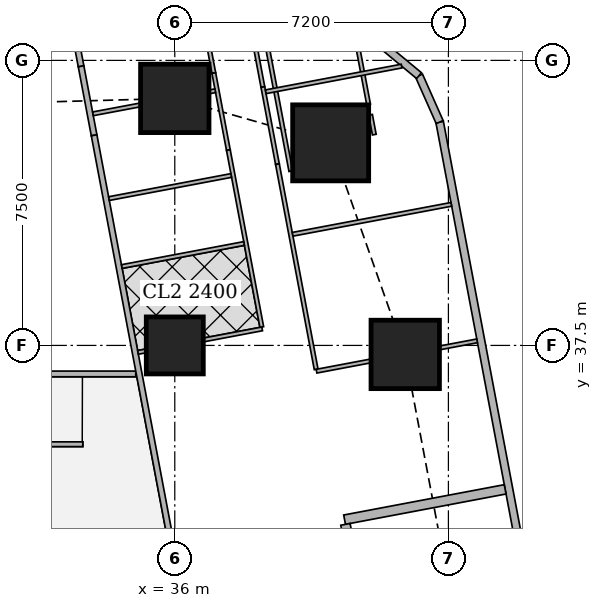
"""IFC4 building model, lengths in metres.
Left out: names, types, materials, properties, quantities, classifications, styles, units other than length and angle.
Written with IfcOpenShell. Run it as: python <this file> out.ifc"""

import sys

from ifc_helpers import new_model, si_unit, direction, frame, frame_2d, origin, origin_2d, place, context, subcontext, project, spatial, rectangle, extrude, element, fill, save


model = new_model("IFC4")
c1 = context("Model", 3, precision=1e-05, world=origin(), true_north=direction((0.0, 1.0)))
c2 = subcontext(c1, "Body", "Model", "MODEL_VIEW")
j1 = project(units=[si_unit("LENGTHUNIT", "METRE"), si_unit("PLANEANGLEUNIT", "RADIAN")], contexts=[c1])
p1 = place(None, origin())
s1 = spatial("IfcSite", under=j1, at=p1, CompositionType="ELEMENT")
p2 = place(p1, origin())
s2 = spatial("IfcBuilding", under=s1, at=p2, CompositionType="ELEMENT")
p3 = place(p2, frame((0.0, 0.0, 169.55)))
s3 = spatial("IfcBuildingStorey", under=s2, at=p3, CompositionType="ELEMENT", Elevation=169.55)
p4 = place(p3, frame((36.0, 37.5, 0.0), z_axis=(0.0, 0.0, 1.0), x_axis=(1.0, 0.0, 0.0)))
e1 = element("IfcColumn", 1, at=p4, inside=s3, PredefinedType="COLUMN", context=c2, shape_type="SweptSolid", body=[
    extrude(rectangle(XDim=1.5, YDim=1.5, at=origin_2d()), origin(), (0.0, 0.0, 1.0), 3.75),
])
p5 = place(p3, frame((42.064, 37.263, 0.0), z_axis=(0.0, 0.0, 1.0), x_axis=(1.0, 0.0, 0.0)))
e2 = element("IfcColumn", 2, at=p5, inside=s3, PredefinedType="COLUMN", context=c2, shape_type="SweptSolid", body=[
    extrude(rectangle(XDim=1.8, YDim=1.8, at=origin_2d()), origin(), (0.0, 0.0, 1.0), 3.75),
])
p6 = place(p3, frame((40.102, 42.83, 0.0), z_axis=(0.0, 0.0, 1.0), x_axis=(1.0, 0.0, 0.0)))
e3 = element("IfcColumn", 3, at=p6, inside=s3, PredefinedType="COLUMN", context=c2, shape_type="SweptSolid", body=[
    extrude(rectangle(XDim=2.0, YDim=2.0, at=origin_2d()), origin(), (0.0, 0.0, 1.0), 3.75),
])
p7 = place(p3, frame((36.0, 44.0, 0.0), z_axis=(0.0, 0.0, 1.0), x_axis=(1.0, 0.0, 0.0)))
e4 = element("IfcColumn", 4, at=p7, inside=s3, PredefinedType="COLUMN", context=c2, shape_type="SweptSolid", body=[
    extrude(rectangle(XDim=1.8, YDim=1.8, at=origin_2d()), origin(), (0.0, 0.0, 1.0), 3.75),
])
p8 = place(p3, frame((50.653, 2.703, 0.0), z_axis=(0.0, 0.0, 1.0), x_axis=(-0.185612026696, 0.982623109613, 0.0)))
e5 = element("IfcWall", 5, at=p8, inside=s3, PredefinedType="SOLIDWALL", context=c2, shape_type="SweptSolid", body=[
    extrude(rectangle(XDim=41.393, YDim=0.2, at=frame_2d((20.697, 0.0))), origin(), (0.0, 0.0, 1.0), 3.5),
])
p9 = place(p8, frame((1.633, 0.0, 0.9)))
e6 = element("IfcOpeningElement", 6, at=p9, cuts=e5, PredefinedType="OPENING", context=c2, shape_type="SweptSolid", body=[
    extrude(rectangle(XDim=1.8, YDim=1.5, at=frame_2d((0.9, 0.75))), frame((0.0, 0.11, 0.0), z_axis=(0.0, -1.0, 0.0), x_axis=(1.0, 0.0, 0.0)), (0.0, 0.0, 1.0), 0.22),
])
p10 = place(p8, frame((6.032, 0.0, 0.9)))
e7 = element("IfcOpeningElement", 7, at=p10, cuts=e5, PredefinedType="OPENING", context=c2, shape_type="SweptSolid", body=[
    extrude(rectangle(XDim=1.8, YDim=1.5, at=frame_2d((0.9, 0.75))), frame((0.0, 0.11, 0.0), z_axis=(0.0, -1.0, 0.0), x_axis=(1.0, 0.0, 0.0)), (0.0, 0.0, 1.0), 0.22),
])
p11 = place(p8, frame((9.848, 0.0, 0.9)))
e8 = element("IfcOpeningElement", 8, at=p11, cuts=e5, PredefinedType="OPENING", context=c2, shape_type="SweptSolid", body=[
    extrude(rectangle(XDim=1.8, YDim=1.5, at=frame_2d((0.9, 0.75))), frame((0.0, 0.11, 0.0), z_axis=(0.0, -1.0, 0.0), x_axis=(1.0, 0.0, 0.0)), (0.0, 0.0, 1.0), 0.22),
])
p12 = place(p8, frame((13.664, 0.0, 0.9)))
e9 = element("IfcOpeningElement", 9, at=p12, cuts=e5, PredefinedType="OPENING", context=c2, shape_type="SweptSolid", body=[
    extrude(rectangle(XDim=1.8, YDim=1.5, at=frame_2d((0.9, 0.75))), frame((0.0, 0.11, 0.0), z_axis=(0.0, -1.0, 0.0), x_axis=(1.0, 0.0, 0.0)), (0.0, 0.0, 1.0), 0.22),
])
p13 = place(p8, frame((17.481, 0.0, 0.9)))
e10 = element("IfcOpeningElement", 10, at=p13, cuts=e5, PredefinedType="OPENING", context=c2, shape_type="SweptSolid", body=[
    extrude(rectangle(XDim=1.8, YDim=1.5, at=frame_2d((0.9, 0.75))), frame((0.0, 0.11, 0.0), z_axis=(0.0, -1.0, 0.0), x_axis=(1.0, 0.0, 0.0)), (0.0, 0.0, 1.0), 0.22),
])
p14 = place(p8, frame((21.297, 0.0, 0.9)))
e11 = element("IfcOpeningElement", 11, at=p14, cuts=e5, PredefinedType="OPENING", context=c2, shape_type="SweptSolid", body=[
    extrude(rectangle(XDim=1.8, YDim=1.5, at=frame_2d((0.9, 0.75))), frame((0.0, 0.11, 0.0), z_axis=(0.0, -1.0, 0.0), x_axis=(1.0, 0.0, 0.0)), (0.0, 0.0, 1.0), 0.22),
])
p15 = place(p8, frame((25.113, 0.0, 0.9)))
e12 = element("IfcOpeningElement", 12, at=p15, cuts=e5, PredefinedType="OPENING", context=c2, shape_type="SweptSolid", body=[
    extrude(rectangle(XDim=1.8, YDim=1.5, at=frame_2d((0.9, 0.75))), frame((0.0, 0.11, 0.0), z_axis=(0.0, -1.0, 0.0), x_axis=(1.0, 0.0, 0.0)), (0.0, 0.0, 1.0), 0.22),
])
p16 = place(p8, frame((28.93, 0.0, 0.9)))
e13 = element("IfcOpeningElement", 13, at=p16, cuts=e5, PredefinedType="OPENING", context=c2, shape_type="SweptSolid", body=[
    extrude(rectangle(XDim=1.8, YDim=1.5, at=frame_2d((0.9, 0.75))), frame((0.0, 0.11, 0.0), z_axis=(0.0, -1.0, 0.0), x_axis=(1.0, 0.0, 0.0)), (0.0, 0.0, 1.0), 0.22),
])
p17 = place(p8, frame((32.746, 0.0, 0.9)))
e14 = element("IfcOpeningElement", 14, at=p17, cuts=e5, PredefinedType="OPENING", context=c2, shape_type="SweptSolid", body=[
    extrude(rectangle(XDim=1.8, YDim=1.5, at=frame_2d((0.9, 0.75))), frame((0.0, 0.11, 0.0), z_axis=(0.0, -1.0, 0.0), x_axis=(1.0, 0.0, 0.0)), (0.0, 0.0, 1.0), 0.22),
])
p18 = place(p8, frame((36.481, 0.0, 0.9)))
e15 = element("IfcOpeningElement", 15, at=p18, cuts=e5, PredefinedType="OPENING", context=c2, shape_type="SweptSolid", body=[
    extrude(rectangle(XDim=1.8, YDim=1.5, at=frame_2d((0.9, 0.75))), frame((0.0, 0.11, 0.0), z_axis=(0.0, -1.0, 0.0), x_axis=(1.0, 0.0, 0.0)), (0.0, 0.0, 1.0), 0.22),
])
p19 = place(p3, frame((42.97, 43.377, 0.0), z_axis=(0.0, 0.0, 1.0), x_axis=(-0.406002956633, 0.913871762998, 0.0)))
e16 = element("IfcWall", 16, at=p19, inside=s3, PredefinedType="SOLIDWALL", context=c2, shape_type="SweptSolid", body=[
    extrude(rectangle(XDim=1.337, YDim=0.2, at=frame_2d((0.669, 0.0))), origin(), (0.0, 0.0, 1.0), 3.5),
])
p20 = place(p3, frame((42.427, 44.599, 0.0), z_axis=(0.0, 0.0, 1.0), x_axis=(-0.770091412544, 0.637933551655, 0.0)))
e17 = element("IfcWall", 17, at=p20, inside=s3, PredefinedType="SOLIDWALL", context=c2, shape_type="SweptSolid", body=[
    extrude(rectangle(XDim=1.324, YDim=0.2, at=frame_2d((0.662, 0.0))), origin(), (0.0, 0.0, 1.0), 3.5),
])
p21 = place(p3, frame((29.551, 36.75, 0.0), z_axis=(0.0, 0.0, 1.0), x_axis=(1.0, 0.0, 0.0)))
e18 = element("IfcWall", 18, at=p21, inside=s3, PredefinedType="SOLIDWALL", context=c2, shape_type="SweptSolid", body=[
    extrude(rectangle(XDim=5.422, YDim=0.15, at=frame_2d((2.711, 0.0))), origin(), (0.0, 0.0, 1.0), 3.5),
])
p22 = place(p21, frame((2.895, 0.0, 0.0)))
e19 = element("IfcOpeningElement", 19, at=p22, cuts=e18, PredefinedType="OPENING", context=c2, shape_type="SweptSolid", body=[
    extrude(rectangle(XDim=1.0, YDim=2.1, at=frame_2d((0.5, 1.05))), frame((0.0, 0.085, 0.0), z_axis=(0.0, -1.0, 0.0), x_axis=(1.0, 0.0, 0.0)), (0.0, 0.0, 1.0), 0.17),
])
p23 = place(p3, frame((33.382, 45.65, 0.0), z_axis=(0.0, 0.0, 1.0), x_axis=(0.185169202764, -0.982706653253, 0.0)))
e20 = element("IfcWall", 20, at=p23, inside=s3, PredefinedType="SOLIDWALL", context=c2, shape_type="SweptSolid", body=[
    extrude(rectangle(XDim=0.82, YDim=0.15, at=frame_2d((0.41, 0.0))), origin(), (0.0, 0.0, 1.0), 3.5),
])
p24 = place(p3, frame((33.534, 44.844, 0.0), z_axis=(0.0, 0.0, 1.0), x_axis=(0.185708872674, -0.982604811005, 0.0)))
e21 = element("IfcWall", 21, at=p24, inside=s3, PredefinedType="SOLIDWALL", context=c2, shape_type="SweptSolid", body=[
    extrude(rectangle(XDim=1.847, YDim=0.15, at=frame_2d((0.924, 0.0))), origin(), (0.0, 0.0, 1.0), 2.1),
])
p25 = place(p3, frame((33.877, 43.029, 0.0), z_axis=(0.0, 0.0, 1.0), x_axis=(0.185596841028, -0.98262597798, 0.0)))
e22 = element("IfcWall", 22, at=p25, inside=s3, PredefinedType="SOLIDWALL", context=c2, shape_type="SweptSolid", body=[
    extrude(rectangle(XDim=41.66, YDim=0.15, at=frame_2d((20.83, 0.0))), origin(), (0.0, 0.0, 1.0), 2.5),
])
p26 = place(p25, frame((8.63, 0.0, 0.0)))
e23 = element("IfcOpeningElement", 23, at=p26, cuts=e22, PredefinedType="OPENING", context=c2, shape_type="SweptSolid", body=[
    extrude(rectangle(XDim=1.0, YDim=2.1, at=frame_2d((0.5, 1.05))), frame((0.0, 0.085, 0.0), z_axis=(0.0, -1.0, 0.0), x_axis=(1.0, 0.0, 0.0)), (0.0, 0.0, 1.0), 0.17),
])
p27 = place(p25, frame((13.841, 0.0, 0.0)))
e24 = element("IfcOpeningElement", 24, at=p27, cuts=e22, PredefinedType="OPENING", context=c2, shape_type="SweptSolid", body=[
    extrude(rectangle(XDim=1.0, YDim=2.1, at=frame_2d((0.5, 1.05))), frame((0.0, 0.085, 0.0), z_axis=(0.0, -1.0, 0.0), x_axis=(1.0, 0.0, 0.0)), (0.0, 0.0, 1.0), 0.17),
])
p28 = place(p25, frame((21.474, 0.0, 0.0)))
e25 = element("IfcOpeningElement", 25, at=p28, cuts=e22, PredefinedType="OPENING", context=c2, shape_type="SweptSolid", body=[
    extrude(rectangle(XDim=1.0, YDim=2.1, at=frame_2d((0.5, 1.05))), frame((0.0, 0.085, 0.0), z_axis=(0.0, -1.0, 0.0), x_axis=(1.0, 0.0, 0.0)), (0.0, 0.0, 1.0), 0.17),
])
p29 = place(p25, frame((30.4, 0.0, 0.0)))
e26 = element("IfcOpeningElement", 26, at=p29, cuts=e22, PredefinedType="OPENING", context=c2, shape_type="SweptSolid", body=[
    extrude(rectangle(XDim=1.0, YDim=2.1, at=frame_2d((0.5, 1.05))), frame((0.0, 0.085, 0.0), z_axis=(0.0, -1.0, 0.0), x_axis=(1.0, 0.0, 0.0)), (0.0, 0.0, 1.0), 0.17),
])
p30 = place(p25, frame((32.288, 0.0, 0.0)))
e27 = element("IfcOpeningElement", 27, at=p30, cuts=e22, PredefinedType="OPENING", context=c2, shape_type="SweptSolid", body=[
    extrude(rectangle(XDim=1.0, YDim=2.1, at=frame_2d((0.5, 1.05))), frame((0.0, 0.085, 0.0), z_axis=(0.0, -1.0, 0.0), x_axis=(1.0, 0.0, 0.0)), (0.0, 0.0, 1.0), 0.17),
])
p31 = place(p3, frame((39.054, 42.085, 0.0), z_axis=(0.0, 0.0, 1.0), x_axis=(-0.185791584218, 0.982589175207, 0.0)))
e28 = element("IfcWall", 28, at=p31, inside=s3, PredefinedType="PARTITIONING", context=c2, shape_type="SweptSolid", body=[
    extrude(rectangle(XDim=3.628, YDim=0.1, at=frame_2d((1.814, 0.0))), origin(), (0.0, 0.0, 1.0), 2.1),
])
p32 = place(p3, frame((40.789, 45.487, 0.0), z_axis=(0.0, 0.0, 1.0), x_axis=(0.185572395193, -0.982630594955, 0.0)))
e29 = element("IfcWall", 29, at=p32, inside=s3, PredefinedType="PARTITIONING", context=c2, shape_type="SweptSolid", body=[
    extrude(rectangle(XDim=1.676, YDim=0.1, at=frame_2d((0.838, 0.0))), origin(), (0.0, 0.0, 1.0), 3.5),
])
p33 = place(p3, frame((41.151, 43.569, 0.0), z_axis=(0.0, 0.0, 1.0), x_axis=(0.186563073924, -0.982442985342, 0.0)))
e30 = element("IfcWall", 30, at=p33, inside=s3, PredefinedType="PARTITIONING", context=c2, shape_type="SweptSolid", body=[
    extrude(rectangle(XDim=0.531, YDim=0.1, at=frame_2d((0.266, 0.0))), origin(), (0.0, 0.0, 1.0), 3.5),
])
p34 = place(p3, frame((38.063, 45.65, 0.0), z_axis=(0.0, 0.0, 1.0), x_axis=(0.185456359766, -0.982652501458, 0.0)))
e31 = element("IfcWall", 31, at=p34, inside=s3, PredefinedType="PARTITIONING", context=c2, shape_type="SweptSolid", body=[
    extrude(rectangle(XDim=1.376, YDim=0.1, at=frame_2d((0.688, 0.0))), origin(), (0.0, 0.0, 1.0), 3.5),
])
p35 = place(p3, frame((38.318, 44.298, 0.0), z_axis=(0.0, 0.0, 1.0), x_axis=(0.185481135188, -0.982647825261, 0.0)))
e32 = element("IfcWall", 32, at=p35, inside=s3, PredefinedType="PARTITIONING", context=c2, shape_type="SweptSolid", body=[
    extrude(rectangle(XDim=2.064, YDim=0.1, at=frame_2d((1.032, 0.0))), origin(), (0.0, 0.0, 1.0), 2.1),
])
p36 = place(p3, frame((38.701, 42.27, 0.0), z_axis=(0.0, 0.0, 1.0), x_axis=(0.185474244877, -0.982649125826, 0.0)))
e33 = element("IfcWall", 33, at=p36, inside=s3, PredefinedType="PARTITIONING", context=c2, shape_type="SweptSolid", body=[
    extrude(rectangle(XDim=5.494, YDim=0.1, at=frame_2d((2.747, 0.0))), origin(), (0.0, 0.0, 1.0), 3.5),
])
p37 = place(p36, frame((3.085, 0.0, 0.0)))
e34 = element("IfcOpeningElement", 34, at=p37, cuts=e33, PredefinedType="OPENING", context=c2, shape_type="SweptSolid", body=[
    extrude(rectangle(XDim=0.9, YDim=2.1, at=frame_2d((0.45, 1.05))), frame((0.0, 0.06, 0.0), z_axis=(0.0, -1.0, 0.0), x_axis=(1.0, 0.0, 0.0)), (0.0, 0.0, 1.0), 0.12),
])
p38 = place(p3, frame((36.841, 45.65, 0.0), z_axis=(0.0, 0.0, 1.0), x_axis=(0.185789875365, -0.982589498322, 0.0)))
e35 = element("IfcWall", 35, at=p38, inside=s3, PredefinedType="PARTITIONING", context=c2, shape_type="SweptSolid", body=[
    extrude(rectangle(XDim=1.001, YDim=0.1, at=frame_2d((0.5, 0.0))), origin(), (0.0, 0.0, 1.0), 3.5),
])
p39 = place(p3, frame((37.027, 44.666, 0.0), z_axis=(0.0, 0.0, 1.0), x_axis=(0.1855674151, -0.982631535446, 0.0)))
e36 = element("IfcWall", 36, at=p39, inside=s3, PredefinedType="PARTITIONING", context=c2, shape_type="SweptSolid", body=[
    extrude(rectangle(XDim=2.063, YDim=0.1, at=frame_2d((1.031, 0.0))), origin(), (0.0, 0.0, 1.0), 2.1),
])
p40 = place(p3, frame((37.41, 42.639, 0.0), z_axis=(0.0, 0.0, 1.0), x_axis=(0.185579683022, -0.982629218601, 0.0)))
e37 = element("IfcWall", 37, at=p40, inside=s3, PredefinedType="PARTITIONING", context=c2, shape_type="SweptSolid", body=[
    extrude(rectangle(XDim=4.737, YDim=0.1, at=frame_2d((2.369, 0.0))), origin(), (0.0, 0.0, 1.0), 3.5),
])
p41 = place(p40, frame((3.189, 0.0, 0.0)))
e38 = element("IfcOpeningElement", 38, at=p41, cuts=e37, PredefinedType="OPENING", context=c2, shape_type="SweptSolid", body=[
    extrude(rectangle(XDim=0.9, YDim=2.1, at=frame_2d((0.45, 1.05))), frame((0.0, 0.06, 0.0), z_axis=(0.0, -1.0, 0.0), x_axis=(1.0, 0.0, 0.0)), (0.0, 0.0, 1.0), 0.12),
])
p42 = place(p40, frame((1.131, 0.0, 0.0)))
e39 = element("IfcOpeningElement", 39, at=p42, cuts=e37, PredefinedType="OPENING", context=c2, shape_type="SweptSolid", body=[
    extrude(rectangle(XDim=0.9, YDim=2.1, at=frame_2d((0.45, 1.05))), frame((0.0, 0.06, 0.0), z_axis=(0.0, -1.0, 0.0), x_axis=(1.0, 0.0, 0.0)), (0.0, 0.0, 1.0), 0.12),
])
p43 = place(p3, frame((41.968, 44.85, 0.0), z_axis=(0.0, 0.0, 1.0), x_axis=(-0.98258614234, -0.185807623311, 0.0)))
e40 = element("IfcWall", 40, at=p43, inside=s3, PredefinedType="PARTITIONING", context=c2, shape_type="SweptSolid", body=[
    extrude(rectangle(XDim=3.638, YDim=0.1, at=frame_2d((1.819, 0.0))), origin(), (0.0, 0.0, 1.0), 2.1),
])
p44 = place(p3, frame((43.277, 41.212, 0.0), z_axis=(0.0, 0.0, 1.0), x_axis=(-0.982665405803, -0.185387972203, 0.0)))
e41 = element("IfcWall", 41, at=p44, inside=s3, PredefinedType="PARTITIONING", context=c2, shape_type="SweptSolid", body=[
    extrude(rectangle(XDim=4.25, YDim=0.1, at=frame_2d((2.125, 0.0))), origin(), (0.0, 0.0, 1.0), 2.1),
])
p45 = place(p3, frame((43.955, 37.62, 0.0), z_axis=(0.0, 0.0, 1.0), x_axis=(-0.982666697719, -0.185381124159, 0.0)))
e42 = element("IfcWall", 42, at=p45, inside=s3, PredefinedType="PARTITIONING", context=c2, shape_type="SweptSolid", body=[
    extrude(rectangle(XDim=0.998, YDim=0.1, at=frame_2d((0.499, 0.0))), origin(), (0.0, 0.0, 1.0), 3.5),
])
p46 = place(p3, frame((41.154, 37.091, 0.0), z_axis=(0.0, 0.0, 1.0), x_axis=(-0.982617614942, -0.185641112921, 0.0)))
e43 = element("IfcWall", 43, at=p46, inside=s3, PredefinedType="PARTITIONING", context=c2, shape_type="SweptSolid", body=[
    extrude(rectangle(XDim=1.449, YDim=0.1, at=frame_2d((0.725, 0.0))), origin(), (0.0, 0.0, 1.0), 3.5),
])
p47 = place(p3, frame((37.064, 44.201, 0.0), z_axis=(0.0, 0.0, 1.0), x_axis=(-0.982960250751, -0.183818240236, 0.0)))
e44 = element("IfcWall", 44, at=p47, inside=s3, PredefinedType="PARTITIONING", context=c2, shape_type="SweptSolid", body=[
    extrude(rectangle(XDim=0.157, YDim=0.1, at=frame_2d((0.078, 0.0))), origin(), (0.0, 0.0, 1.0), 2.1),
])
p48 = place(p3, frame((35.09, 43.828, 0.0), z_axis=(0.0, 0.0, 1.0), x_axis=(-0.982758384778, -0.184894448668, 0.0)))
e45 = element("IfcWall", 45, at=p48, inside=s3, PredefinedType="PARTITIONING", context=c2, shape_type="SweptSolid", body=[
    extrude(rectangle(XDim=1.265, YDim=0.1, at=frame_2d((0.632, 0.0))), origin(), (0.0, 0.0, 1.0), 2.1),
])
p49 = place(p3, frame((37.823, 40.182, 0.0), z_axis=(0.0, 0.0, 1.0), x_axis=(-0.982664729897, -0.18539155487, 0.0)))
e46 = element("IfcWall", 46, at=p49, inside=s3, PredefinedType="PARTITIONING", context=c2, shape_type="SweptSolid", body=[
    extrude(rectangle(XDim=3.274, YDim=0.1, at=frame_2d((1.637, 0.0))), origin(), (0.0, 0.0, 1.0), 3.5),
])
p50 = place(p3, frame((38.299, 37.935, 0.0), z_axis=(0.0, 0.0, 1.0), x_axis=(-0.98258870752, -0.18579405764, 0.0)))
e47 = element("IfcWall", 47, at=p50, inside=s3, PredefinedType="PARTITIONING", context=c2, shape_type="SweptSolid", body=[
    extrude(rectangle(XDim=1.566, YDim=0.1, at=frame_2d((0.783, 0.0))), origin(), (0.0, 0.0, 1.0), 3.5),
])
p51 = place(p3, frame((35.24, 37.356, 0.0), z_axis=(0.0, 0.0, 1.0), x_axis=(-0.982819911474, -0.184567119526, 0.0)))
e48 = element("IfcWall", 48, at=p51, inside=s3, PredefinedType="PARTITIONING", context=c2, shape_type="SweptSolid", body=[
    extrude(rectangle(XDim=0.212, YDim=0.1, at=frame_2d((0.106, 0.0))), origin(), (0.0, 0.0, 1.0), 3.5),
])
p52 = place(p3, frame((37.485, 41.971, 0.0), z_axis=(0.0, 0.0, 1.0), x_axis=(-0.982610347627, -0.185679575441, 0.0)))
e49 = element("IfcWall", 49, at=p52, inside=s3, PredefinedType="PARTITIONING", context=c2, shape_type="SweptSolid", body=[
    extrude(rectangle(XDim=3.274, YDim=0.1, at=frame_2d((1.637, 0.0))), origin(), (0.0, 0.0, 1.0), 3.5),
])
p53 = place(p52, frame((1.2, 0.0, 0.0)))
e50 = element("IfcOpeningElement", 50, at=p53, cuts=e49, PredefinedType="OPENING", context=c2, shape_type="SweptSolid", body=[
    extrude(rectangle(XDim=0.9, YDim=2.1, at=frame_2d((0.45, 1.05))), frame((0.0, 0.06, 0.0), z_axis=(0.0, -1.0, 0.0), x_axis=(1.0, 0.0, 0.0)), (0.0, 0.0, 1.0), 0.12),
])
p54 = place(p3, frame((44.693, 33.713, 0.0), z_axis=(0.0, 0.0, 1.0), x_axis=(-0.982633535512, -0.185556823879, 0.0)))
e51 = element("IfcWall", 51, at=p54, inside=s3, PredefinedType="SOLIDWALL", context=c2, shape_type="SweptSolid", body=[
    extrude(rectangle(XDim=4.3, YDim=0.25, at=frame_2d((2.15, 0.0))), origin(), (0.0, 0.0, 1.0), 2.1),
])
p55 = place(p3, frame((40.491, 32.792, 0.0), z_axis=(0.0, 0.0, 1.0), x_axis=(0.18607888991, -0.982534806879, 0.0)))
e52 = element("IfcWall", 52, at=p55, inside=s3, PredefinedType="SOLIDWALL", context=c2, shape_type="SweptSolid", body=[
    extrude(rectangle(XDim=1.021, YDim=0.25, at=frame_2d((0.51, 0.0))), origin(), (0.0, 0.0, 1.0), 3.5),
])
p56 = place(p3, frame((28.95, 34.9, 0.0), z_axis=(0.0, 0.0, 1.0), x_axis=(1.0, 0.0, 0.0)))
e53 = element("IfcWall", 53, at=p56, inside=s3, PredefinedType="PARTITIONING", context=c2, shape_type="SweptSolid", body=[
    extrude(rectangle(XDim=4.63, YDim=0.125, at=frame_2d((2.315, 0.0))), origin(), (0.0, 0.0, 1.0), 3.5),
])
p57 = place(p16, origin())
e54 = element("IfcWindow", 54, at=p57, inside=s3, PartitioningType="SINGLE_PANEL", PredefinedType="WINDOW", context=c2, shape_type="SweptSolid", body=[
    extrude(rectangle(XDim=1.8, YDim=1.5, at=frame_2d((0.9, 0.75))), frame((0.0, 0.03, 0.0), z_axis=(0.0, -1.0, 0.0), x_axis=(1.0, 0.0, 0.0)), (0.0, 0.0, 1.0), 0.06),
])
fill(e13, e54)
p58 = place(p17, origin())
e55 = element("IfcWindow", 55, at=p58, inside=s3, PartitioningType="SINGLE_PANEL", PredefinedType="WINDOW", context=c2, shape_type="SweptSolid", body=[
    extrude(rectangle(XDim=1.8, YDim=1.5, at=frame_2d((0.9, 0.75))), frame((0.0, 0.03, 0.0), z_axis=(0.0, -1.0, 0.0), x_axis=(1.0, 0.0, 0.0)), (0.0, 0.0, 1.0), 0.06),
])
fill(e14, e55)
p59 = place(p18, origin())
e56 = element("IfcWindow", 56, at=p59, inside=s3, PartitioningType="SINGLE_PANEL", PredefinedType="WINDOW", context=c2, shape_type="SweptSolid", body=[
    extrude(rectangle(XDim=1.8, YDim=1.5, at=frame_2d((0.9, 0.75))), frame((0.0, 0.03, 0.0), z_axis=(0.0, -1.0, 0.0), x_axis=(1.0, 0.0, 0.0)), (0.0, 0.0, 1.0), 0.06),
])
fill(e15, e56)
p60 = place(p37, origin())
e57 = element("IfcDoor", 57, at=p60, inside=s3, OperationType="SINGLE_SWING_LEFT", PredefinedType="DOOR", context=c2, shape_type="SweptSolid", body=[
    extrude(rectangle(XDim=0.9, YDim=2.1, at=frame_2d((0.45, 1.05))), frame((0.0, 0.025, 0.0), z_axis=(0.0, -1.0, 0.0), x_axis=(1.0, 0.0, 0.0)), (0.0, 0.0, 1.0), 0.05),
])
fill(e34, e57)
p61 = place(p41, origin())
e58 = element("IfcDoor", 58, at=p61, inside=s3, OperationType="SINGLE_SWING_LEFT", PredefinedType="DOOR", context=c2, shape_type="SweptSolid", body=[
    extrude(rectangle(XDim=0.9, YDim=2.1, at=frame_2d((0.45, 1.05))), frame((0.0, 0.025, 0.0), z_axis=(0.0, -1.0, 0.0), x_axis=(1.0, 0.0, 0.0)), (0.0, 0.0, 1.0), 0.05),
])
fill(e38, e58)
p62 = place(p42, origin())
e59 = element("IfcDoor", 59, at=p62, inside=s3, OperationType="SINGLE_SWING_RIGHT", PredefinedType="DOOR", context=c2, shape_type="SweptSolid", body=[
    extrude(rectangle(XDim=0.9, YDim=2.1, at=frame_2d((0.45, 1.05))), frame((0.0, 0.025, 0.0), z_axis=(0.0, -1.0, 0.0), x_axis=(1.0, 0.0, 0.0)), (0.0, 0.0, 1.0), 0.05),
])
fill(e39, e59)
p63 = place(p53, origin())
e60 = element("IfcDoor", 60, at=p63, inside=s3, OperationType="SINGLE_SWING_LEFT", PredefinedType="DOOR", context=c2, shape_type="SweptSolid", body=[
    extrude(rectangle(XDim=0.9, YDim=2.1, at=frame_2d((0.45, 1.05))), frame((0.0, 0.025, 0.0), z_axis=(0.0, -1.0, 0.0), x_axis=(1.0, 0.0, 0.0)), (0.0, 0.0, 1.0), 0.05),
])
fill(e50, e60)
p64 = place(p26, origin())
e61 = element("IfcDoor", 61, at=p64, inside=s3, OperationType="SINGLE_SWING_RIGHT", PredefinedType="DOOR", context=c2, shape_type="SweptSolid", body=[
    extrude(rectangle(XDim=1.0, YDim=2.1, at=frame_2d((0.5, 1.05))), frame((0.0, 0.025, 0.0), z_axis=(0.0, -1.0, 0.0), x_axis=(1.0, 0.0, 0.0)), (0.0, 0.0, 1.0), 0.05),
])
fill(e23, e61)
p65 = place(p22, origin())
e62 = element("IfcDoor", 62, at=p65, inside=s3, OperationType="SINGLE_SWING_RIGHT", PredefinedType="DOOR", context=c2, shape_type="SweptSolid", body=[
    extrude(rectangle(XDim=1.0, YDim=2.1, at=frame_2d((0.5, 1.05))), frame((0.0, 0.025, 0.0), z_axis=(0.0, -1.0, 0.0), x_axis=(1.0, 0.0, 0.0)), (0.0, 0.0, 1.0), 0.05),
])
fill(e19, e62)
save(model, sys.argv[1])
